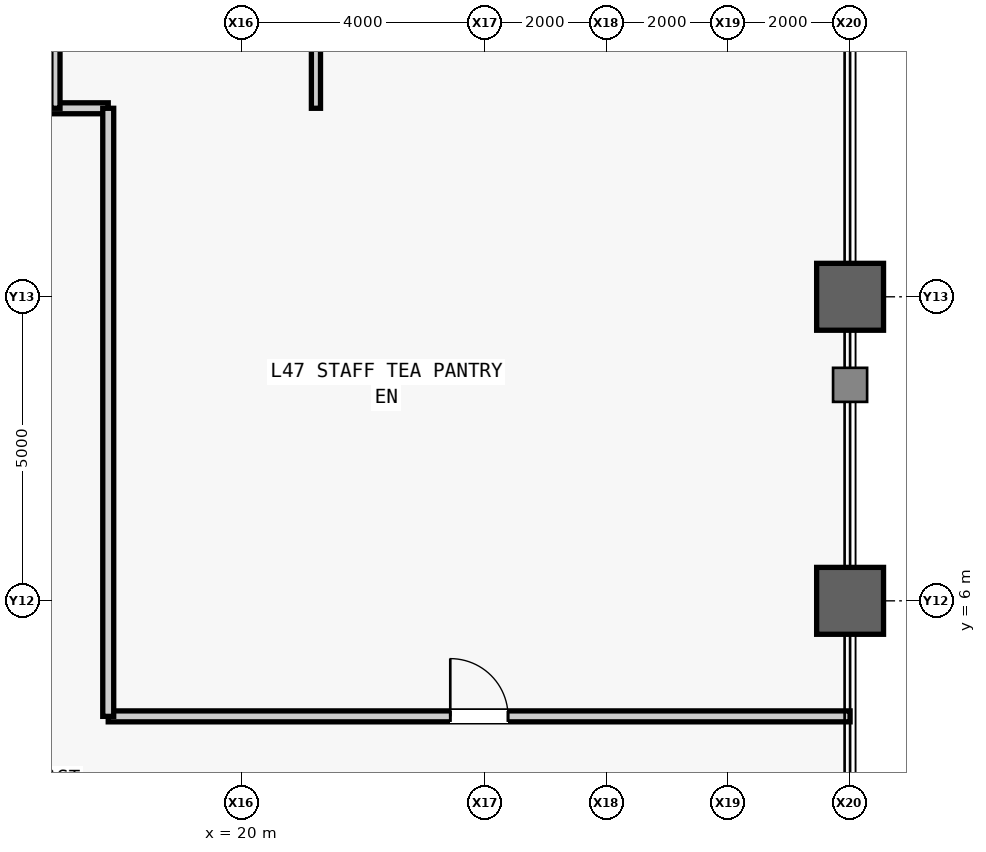
"""IFC4 building model, lengths in metres.
Left out: names, types, materials, properties, quantities, classifications, styles, units other than length and angle.
Written with IfcOpenShell. Run it as: python <this file> out.ifc"""

import sys

from ifc_helpers import new_model, si_unit, direction, frame, frame_2d, origin, origin_2d, place, context, subcontext, project, spatial, rectangle, hollow_rectangle, extrude, source, transform, mapped, element, fill, save


model = new_model("IFC4")
c1 = context("Model", 3, precision=1e-05, world=origin(), true_north=direction((0.0, 1.0)))
c2 = subcontext(c1, "Body", "Model", "MODEL_VIEW")
j1 = project(units=[si_unit("LENGTHUNIT", "METRE"), si_unit("PLANEANGLEUNIT", "RADIAN")], contexts=[c1])
p1 = place(None, origin())
s1 = spatial("IfcSite", under=j1, at=p1, CompositionType="ELEMENT")
p2 = place(p1, origin())
s2 = spatial("IfcBuilding", under=s1, at=p2, CompositionType="ELEMENT")
p3 = place(p2, frame((0.0, 0.0, 203.1)))
s3 = spatial("IfcBuildingStorey", under=s2, at=p3, CompositionType="ELEMENT", Elevation=203.1)
m1 = source(origin(), c2, "Body", "SweptSolid", [
    extrude(hollow_rectangle(XDim=1.1, YDim=1.1, WallThickness=0.06, at=origin_2d()), origin(), (0.0, 0.0, 1.0), 4.0),
])
for number, where, z_axis, x_axis in (
    (1, (30.0, 6.0, 0.0), (0.0, 0.0, 1.0), (1.0, 0.0, 0.0)),
    (2, (30.0, 11.0, 0.0), (0.0, 0.0, 1.0), (1.0, 0.0, 0.0)),
):
    element("IfcColumn", number, at=place(p3, frame(where, z_axis=z_axis, x_axis=x_axis)), inside=s3, PredefinedType="COLUMN", context=c2, shape_type="MappedRepresentation", body=[
        mapped(m1, transform((0.0, 0.0, 0.0), scale=1.0)),
    ])
m2 = source(origin(), c2, "Body", "SweptSolid", [
    extrude(rectangle(XDim=2.45, YDim=0.18, at=frame_2d((1.225, 0.0))), origin(), (0.0, 0.0, 1.0), 3.78),
])
p4 = place(p3, frame((15.35, 14.1, 0.0), z_axis=(0.0, 0.0, 1.0), x_axis=(1.0, 0.0, 0.0)))
e3 = element("IfcWall", 3, at=p4, inside=s3, PredefinedType="PARTITIONING", context=c2, shape_type="MappedRepresentation", body=[
    mapped(m2, transform((0.0, 0.0, 0.0), scale=1.0)),
])
m3 = source(origin(), c2, "Body", "SweptSolid", [
    extrude(rectangle(XDim=15.9, YDim=0.15, at=frame_2d((7.95, 0.0))), origin(), (0.0, 0.0, 1.0), 3.78),
])
p5 = place(p3, frame((16.932, 14.1, 0.0), z_axis=(0.0, 0.0, 1.0), x_axis=(0.0, 1.0, 0.0)))
e4 = element("IfcWall", 4, at=p5, inside=s3, PredefinedType="PARTITIONING", context=c2, shape_type="MappedRepresentation", body=[
    mapped(m3, transform((0.0, 0.0, 0.0), scale=1.0)),
])
m4 = source(origin(), c2, "Body", "SweptSolid", [
    extrude(rectangle(XDim=0.95, YDim=2.15, at=frame_2d((0.475, 1.075))), frame((0.0, 0.085, 0.0), z_axis=(0.0, -1.0, 0.0), x_axis=(1.0, 0.0, 0.0)), (0.0, 0.0, 1.0), 0.17),
])
p6 = place(p5, frame((11.45, 0.0, 0.0)))
e5 = element("IfcOpeningElement", 5, at=p6, cuts=e4, PredefinedType="OPENING", context=c2, shape_type="MappedRepresentation", body=[
    mapped(m4, transform((0.0, 0.0, 0.0), scale=1.0)),
])
p7 = place(p3, frame((21.216, 14.1, 0.0), z_axis=(0.0, 0.0, 1.0), x_axis=(0.0, 1.0, 0.0)))
e6 = element("IfcWall", 6, at=p7, inside=s3, PredefinedType="PARTITIONING", context=c2, shape_type="MappedRepresentation", body=[
    mapped(m3, transform((0.0, 0.0, 0.0), scale=1.0)),
])
p8 = place(p7, frame((11.45, 0.0, 0.0)))
e7 = element("IfcOpeningElement", 7, at=p8, cuts=e6, PredefinedType="OPENING", context=c2, shape_type="MappedRepresentation", body=[
    mapped(m4, transform((0.0, 0.0, 0.0), scale=1.0)),
])
m5 = source(origin(), c2, "Body", "SweptSolid", [
    extrude(rectangle(XDim=12.2, YDim=0.18, at=frame_2d((6.1, 0.0))), origin(), (0.0, 0.0, 1.0), 3.78),
])
p9 = place(p3, frame((17.8, 4.1, 0.0), z_axis=(0.0, 0.0, 1.0), x_axis=(1.0, 0.0, 0.0)))
e8 = element("IfcWall", 8, at=p9, inside=s3, PredefinedType="PARTITIONING", context=c2, shape_type="MappedRepresentation", body=[
    mapped(m5, transform((0.0, 0.0, 0.0), scale=1.0)),
])
m6 = source(origin(), c2, "Body", "SweptSolid", [
    extrude(rectangle(XDim=0.95, YDim=2.15, at=frame_2d((0.475, 1.075))), frame((0.0, 0.1, 0.0), z_axis=(0.0, -1.0, 0.0), x_axis=(1.0, 0.0, 0.0)), (0.0, 0.0, 1.0), 0.2),
])
p10 = place(p9, frame((5.625, 0.0, 0.0)))
e9 = element("IfcOpeningElement", 9, at=p10, cuts=e8, PredefinedType="OPENING", context=c2, shape_type="MappedRepresentation", body=[
    mapped(m6, transform((0.0, 0.0, 0.0), scale=1.0)),
])
m7 = source(origin(), c2, "Body", "SweptSolid", [
    extrude(rectangle(XDim=10.0, YDim=0.18, at=frame_2d((5.0, 0.0))), origin(), (0.0, 0.0, 1.0), 3.78),
])
p11 = place(p3, frame((17.8, 4.1, 0.0), z_axis=(0.0, 0.0, 1.0), x_axis=(0.0, 1.0, 0.0)))
e10 = element("IfcWall", 10, at=p11, inside=s3, PredefinedType="PARTITIONING", context=c2, shape_type="MappedRepresentation", body=[
    mapped(m7, transform((0.0, 0.0, 0.0), scale=1.0)),
])
m8 = source(origin(), c2, "Body", "SweptSolid", [
    extrude(rectangle(XDim=0.95, YDim=2.15, at=frame_2d((0.475, 1.075))), frame((0.0, 0.025, 0.0), z_axis=(0.0, -1.0, 0.0), x_axis=(1.0, 0.0, 0.0)), (0.0, 0.0, 1.0), 0.05),
])
p12 = place(p10, origin())
e11 = element("IfcDoor", 11, at=p12, inside=s3, OperationType="SINGLE_SWING_LEFT", PredefinedType="DOOR", context=c2, shape_type="MappedRepresentation", body=[
    mapped(m8, transform((0.0, 0.0, 0.0), scale=1.0)),
])
fill(e9, e11)
save(model, sys.argv[1])
